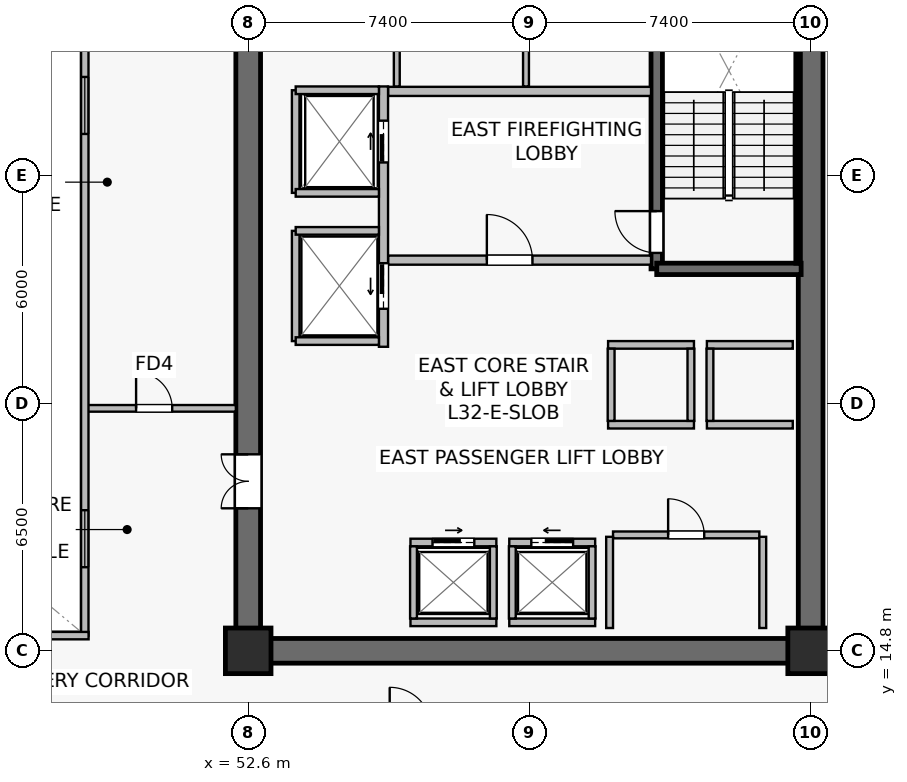
"""IFC4 building model, lengths in metres.
Left out: names, types, materials, properties, quantities, classifications, styles, units other than length and angle.
Written with IfcOpenShell. Run it as: python <this file> out.ifc"""

import sys

from ifc_helpers import new_model, si_unit, direction, frame, frame_2d, origin, origin_2d, place, context, subcontext, project, spatial, rectangle, extrude, source, transform, mapped, element, fill, save


model = new_model("IFC4")
c1 = context("Model", 3, precision=1e-05, world=origin(), true_north=direction((0.0, 1.0)))
c2 = subcontext(c1, "Body", "Model", "MODEL_VIEW")
j1 = project(units=[si_unit("LENGTHUNIT", "METRE"), si_unit("PLANEANGLEUNIT", "RADIAN")], contexts=[c1])
p1 = place(None, origin())
s1 = spatial("IfcSite", under=j1, at=p1, CompositionType="ELEMENT")
p2 = place(p1, origin())
s2 = spatial("IfcBuilding", under=s1, at=p2, CompositionType="ELEMENT")
p3 = place(p2, frame((0.0, 0.0, 133.8)))
s3 = spatial("IfcBuildingStorey", under=s2, at=p3, CompositionType="ELEMENT", Elevation=133.8)
p4 = place(p3, frame((52.275, 14.8, 0.0), z_axis=(0.0, 0.0, 1.0), x_axis=(1.0, 0.0, 0.0)))
e1 = element("IfcWall", 1, at=p4, inside=s3, PredefinedType="SHEAR", context=c2, shape_type="SweptSolid", body=[
    extrude(rectangle(XDim=15.45, YDim=0.65, at=frame_2d((7.725, 0.0))), origin(), (0.0, 0.0, 1.0), 3.79),
])
p5 = place(p3, frame((52.6, 15.125, 0.0), z_axis=(0.0, 0.0, 1.0), x_axis=(0.0, 1.0, 0.0)))
e2 = element("IfcWall", 2, at=p5, inside=s3, PredefinedType="SHEAR", context=c2, shape_type="SweptSolid", body=[
    extrude(rectangle(XDim=18.35, YDim=0.65, at=frame_2d((9.175, 0.0))), origin(), (0.0, 0.0, 1.0), 3.79),
])
p6 = place(p5, frame((3.425, 0.0, 0.0)))
e3 = element("IfcOpeningElement", 3, at=p6, cuts=e2, PredefinedType="OPENING", context=c2, shape_type="SweptSolid", body=[
    extrude(rectangle(XDim=1.42, YDim=2.2, at=frame_2d((0.71, 1.1))), frame((0.0, 0.335, 0.0), z_axis=(0.0, -1.0, 0.0), x_axis=(1.0, 0.0, 0.0)), (0.0, 0.0, 1.0), 0.67),
])
p7 = place(p3, frame((67.4, 15.125, 0.0), z_axis=(0.0, 0.0, 1.0), x_axis=(0.0, 1.0, 0.0)))
e4 = element("IfcWall", 4, at=p7, inside=s3, PredefinedType="SHEAR", context=c2, shape_type="SweptSolid", body=[
    extrude(rectangle(XDim=18.35, YDim=0.65, at=frame_2d((9.175, 0.0))), origin(), (0.0, 0.0, 1.0), 3.79),
])
p8 = place(p3, frame((63.35, 24.85, 0.0), z_axis=(0.0, 0.0, 1.0), x_axis=(0.0, 1.0, 0.0)))
e5 = element("IfcWall", 5, at=p8, inside=s3, PredefinedType="SHEAR", context=c2, shape_type="SweptSolid", body=[
    extrude(rectangle(XDim=8.63, YDim=0.3, at=frame_2d((4.315, 0.0))), origin(), (0.0, 0.0, 1.0), 3.79),
])
p9 = place(p8, frame((0.42, 0.0, 0.0)))
e6 = element("IfcOpeningElement", 6, at=p9, cuts=e5, PredefinedType="OPENING", context=c2, shape_type="SweptSolid", body=[
    extrude(rectangle(XDim=1.1, YDim=2.15, at=frame_2d((0.55, 1.075))), frame((0.0, 0.16, 0.0), z_axis=(0.0, -1.0, 0.0), x_axis=(1.0, 0.0, 0.0)), (0.0, 0.0, 1.0), 0.32),
])
p10 = place(p3, frame((63.35, 24.85, 0.0), z_axis=(0.0, 0.0, 1.0), x_axis=(1.0, 0.0, 0.0)))
e7 = element("IfcWall", 7, at=p10, inside=s3, PredefinedType="SHEAR", context=c2, shape_type="SweptSolid", body=[
    extrude(rectangle(XDim=3.8, YDim=0.3, at=frame_2d((1.9, 0.0))), origin(), (0.0, 0.0, 1.0), 3.79),
])
p11 = place(p3, frame((67.07, 25.0, 0.0), z_axis=(0.0, 0.0, 1.0), x_axis=(0.0, 1.0, 0.0)))
e8 = element("IfcWall", 8, at=p11, inside=s3, PredefinedType="SOLIDWALL", context=c2, shape_type="SweptSolid", body=[
    extrude(rectangle(XDim=8.32, YDim=0.12, at=frame_2d((4.16, 0.0))), origin(), (0.0, 0.0, 1.0), 3.79),
])
m1 = source(origin(), c2, "Body", "SweptSolid", [
    extrude(rectangle(XDim=1.2, YDim=1.2, at=origin_2d()), origin(), (0.0, 0.0, 1.0), 4.1),
])
for number, where, z_axis, x_axis in (
    (9, (52.6, 14.8, 0.0), (0.0, 0.0, 1.0), (1.0, 0.0, 0.0)),
    (10, (67.4, 14.8, 0.0), (0.0, 0.0, 1.0), (1.0, 0.0, 0.0)),
):
    element("IfcColumn", number, at=place(p3, frame(where, z_axis=z_axis, x_axis=x_axis)), inside=s3, PredefinedType="COLUMN", context=c2, shape_type="MappedRepresentation", body=[
        mapped(m1, transform((0.0, 0.0, 0.0), scale=1.0)),
    ])
p12 = place(p3, frame((56.28, 25.08, 0.0), z_axis=(0.0, 0.0, 1.0), x_axis=(1.0, 0.0, 0.0)))
e11 = element("IfcWall", 11, at=p12, inside=s3, PredefinedType="SOLIDWALL", context=c2, shape_type="SweptSolid", body=[
    extrude(rectangle(XDim=6.92, YDim=0.24, at=frame_2d((3.46, 0.0))), origin(), (0.0, 0.0, 1.0), 3.125),
])
p13 = place(p12, frame((2.6, 0.0, 0.0)))
e12 = element("IfcOpeningElement", 12, at=p13, cuts=e11, PredefinedType="OPENING", context=c2, shape_type="SweptSolid", body=[
    extrude(rectangle(XDim=1.2, YDim=2.16, at=frame_2d((0.6, 1.08))), frame((0.0, 0.13, 0.0), z_axis=(0.0, -1.0, 0.0), x_axis=(1.0, 0.0, 0.0)), (0.0, 0.0, 1.0), 0.26),
])
p14 = place(p3, frame((56.28, 29.52, 0.0), z_axis=(0.0, 0.0, 1.0), x_axis=(1.0, 0.0, 0.0)))
e13 = element("IfcWall", 13, at=p14, inside=s3, PredefinedType="SOLIDWALL", context=c2, shape_type="SweptSolid", body=[
    extrude(rectangle(XDim=6.92, YDim=0.24, at=frame_2d((3.46, 0.0))), origin(), (0.0, 0.0, 1.0), 3.125),
])
p15 = place(p3, frame((56.16, 22.8, 0.0), z_axis=(0.0, 0.0, 1.0), x_axis=(0.0, 1.0, 0.0)))
e14 = element("IfcWall", 14, at=p15, inside=s3, PredefinedType="SOLIDWALL", context=c2, shape_type="SweptSolid", body=[
    extrude(rectangle(XDim=6.85, YDim=0.24, at=frame_2d((3.425, 0.0))), origin(), (0.0, 0.0, 1.0), 2.875),
])
p16 = place(p15, frame((4.85, 0.0, 0.0)))
e15 = element("IfcOpeningElement", 15, at=p16, cuts=e14, PredefinedType="OPENING", context=c2, shape_type="SweptSolid", body=[
    extrude(rectangle(XDim=1.1, YDim=2.22, at=frame_2d((0.55, 1.11))), frame((0.0, 0.13, 0.0), z_axis=(0.0, -1.0, 0.0), x_axis=(1.0, 0.0, 0.0)), (0.0, 0.0, 1.0), 0.26),
])
p17 = place(p15, frame((1.0, 0.0, 0.0)))
e16 = element("IfcOpeningElement", 16, at=p17, cuts=e14, PredefinedType="OPENING", context=c2, shape_type="SweptSolid", body=[
    extrude(rectangle(XDim=1.2, YDim=2.22, at=frame_2d((0.6, 1.11))), frame((0.0, 0.13, 0.0), z_axis=(0.0, -1.0, 0.0), x_axis=(1.0, 0.0, 0.0)), (0.0, 0.0, 1.0), 0.26),
])
p18 = place(p3, frame((59.47, 17.65, 0.0), z_axis=(0.0, 0.0, 1.0), x_axis=(1.0, 0.0, 0.0)))
e17 = element("IfcWall", 17, at=p18, inside=s3, PredefinedType="SOLIDWALL", context=c2, shape_type="SweptSolid", body=[
    extrude(rectangle(XDim=2.26, YDim=0.2, at=frame_2d((1.13, 0.0))), origin(), (0.0, 0.0, 1.0), 3.125),
])
p19 = place(p18, frame((0.58, 0.0, 0.0)))
e18 = element("IfcOpeningElement", 18, at=p19, cuts=e17, PredefinedType="OPENING", context=c2, shape_type="SweptSolid", body=[
    extrude(rectangle(XDim=1.1, YDim=2.22, at=frame_2d((0.55, 1.11))), frame((0.0, 0.11, 0.0), z_axis=(0.0, -1.0, 0.0), x_axis=(1.0, 0.0, 0.0)), (0.0, 0.0, 1.0), 0.22),
])
p20 = place(p3, frame((59.47, 15.55, 0.0), z_axis=(0.0, 0.0, 1.0), x_axis=(1.0, 0.0, 0.0)))
e19 = element("IfcWall", 19, at=p20, inside=s3, PredefinedType="SOLIDWALL", context=c2, shape_type="SweptSolid", body=[
    extrude(rectangle(XDim=2.26, YDim=0.2, at=frame_2d((1.13, 0.0))), origin(), (0.0, 0.0, 1.0), 3.125),
])
for number, where, z_axis, x_axis in (
    (20, (59.55, 15.65, 0.0), (0.0, 0.0, 1.0), (0.0, 1.0, 0.0)),
    (21, (61.65, 15.65, 0.0), (0.0, 0.0, 1.0), (0.0, 1.0, 0.0)),
):
    element("IfcWall", number, at=place(p3, frame(where, z_axis=z_axis, x_axis=x_axis)), inside=s3, PredefinedType="SOLIDWALL", context=c2, shape_type="SweptSolid", body=[
        extrude(rectangle(XDim=1.9, YDim=0.18, at=frame_2d((0.95, 0.0))), origin(), (0.0, 0.0, 1.0), 3.79),
    ])
p21 = place(p3, frame((56.87, 17.65, 0.0), z_axis=(0.0, 0.0, 1.0), x_axis=(1.0, 0.0, 0.0)))
e22 = element("IfcWall", 22, at=p21, inside=s3, PredefinedType="SOLIDWALL", context=c2, shape_type="SweptSolid", body=[
    extrude(rectangle(XDim=2.26, YDim=0.2, at=frame_2d((1.13, 0.0))), origin(), (0.0, 0.0, 1.0), 3.79),
])
p22 = place(p21, frame((0.58, 0.0, 0.0)))
e23 = element("IfcOpeningElement", 23, at=p22, cuts=e22, PredefinedType="OPENING", context=c2, shape_type="SweptSolid", body=[
    extrude(rectangle(XDim=1.1, YDim=2.22, at=frame_2d((0.55, 1.11))), frame((0.0, 0.11, 0.0), z_axis=(0.0, -1.0, 0.0), x_axis=(1.0, 0.0, 0.0)), (0.0, 0.0, 1.0), 0.22),
])
p23 = place(p3, frame((56.87, 15.55, 0.0), z_axis=(0.0, 0.0, 1.0), x_axis=(1.0, 0.0, 0.0)))
e24 = element("IfcWall", 24, at=p23, inside=s3, PredefinedType="SOLIDWALL", context=c2, shape_type="SweptSolid", body=[
    extrude(rectangle(XDim=2.26, YDim=0.2, at=frame_2d((1.13, 0.0))), origin(), (0.0, 0.0, 1.0), 3.79),
])
for number, where, z_axis, x_axis in (
    (25, (56.95, 15.65, 0.0), (0.0, 0.0, 1.0), (0.0, 1.0, 0.0)),
    (26, (59.05, 15.65, 0.0), (0.0, 0.0, 1.0), (0.0, 1.0, 0.0)),
):
    element("IfcWall", number, at=place(p3, frame(where, z_axis=z_axis, x_axis=x_axis)), inside=s3, PredefinedType="SOLIDWALL", context=c2, shape_type="SweptSolid", body=[
        extrude(rectangle(XDim=1.9, YDim=0.18, at=frame_2d((0.95, 0.0))), origin(), (0.0, 0.0, 1.0), 3.79),
    ])
for number, where, z_axis, x_axis in (
    (27, (64.67, 20.75, 0.0), (0.0, 0.0, 1.0), (1.0, 0.0, 0.0)),
    (28, (64.67, 22.85, 0.0), (0.0, 0.0, 1.0), (1.0, 0.0, 0.0)),
):
    element("IfcWall", number, at=place(p3, frame(where, z_axis=z_axis, x_axis=x_axis)), inside=s3, PredefinedType="SOLIDWALL", context=c2, shape_type="SweptSolid", body=[
        extrude(rectangle(XDim=2.26, YDim=0.2, at=frame_2d((1.13, 0.0))), origin(), (0.0, 0.0, 1.0), 3.79),
    ])
p24 = place(p3, frame((64.75, 20.85, 0.0), z_axis=(0.0, 0.0, 1.0), x_axis=(0.0, 1.0, 0.0)))
e29 = element("IfcWall", 29, at=p24, inside=s3, PredefinedType="SOLIDWALL", context=c2, shape_type="SweptSolid", body=[
    extrude(rectangle(XDim=1.9, YDim=0.18, at=frame_2d((0.95, 0.0))), origin(), (0.0, 0.0, 1.0), 3.79),
])
for number, where, z_axis, x_axis in (
    (30, (62.07, 20.75, 0.0), (0.0, 0.0, 1.0), (1.0, 0.0, 0.0)),
    (31, (62.07, 22.85, 0.0), (0.0, 0.0, 1.0), (1.0, 0.0, 0.0)),
):
    element("IfcWall", number, at=place(p3, frame(where, z_axis=z_axis, x_axis=x_axis)), inside=s3, PredefinedType="SOLIDWALL", context=c2, shape_type="SweptSolid", body=[
        extrude(rectangle(XDim=2.26, YDim=0.2, at=frame_2d((1.13, 0.0))), origin(), (0.0, 0.0, 1.0), 3.79),
    ])
for number, where, z_axis, x_axis in (
    (32, (62.15, 20.85, 0.0), (0.0, 0.0, 1.0), (0.0, 1.0, 0.0)),
    (33, (64.25, 20.85, 0.0), (0.0, 0.0, 1.0), (0.0, 1.0, 0.0)),
):
    element("IfcWall", number, at=place(p3, frame(where, z_axis=z_axis, x_axis=x_axis)), inside=s3, PredefinedType="SOLIDWALL", context=c2, shape_type="SweptSolid", body=[
        extrude(rectangle(XDim=1.9, YDim=0.18, at=frame_2d((0.95, 0.0))), origin(), (0.0, 0.0, 1.0), 3.79),
    ])
p25 = place(p3, frame((53.85, 26.85, 0.0), z_axis=(0.0, 0.0, 1.0), x_axis=(0.0, 1.0, 0.0)))
e34 = element("IfcWall", 34, at=p25, inside=s3, PredefinedType="SOLIDWALL", context=c2, shape_type="SweptSolid", body=[
    extrude(rectangle(XDim=2.7, YDim=0.2, at=frame_2d((1.35, 0.0))), origin(), (0.0, 0.0, 1.0), 3.79),
])
p26 = place(p3, frame((53.85, 29.55, 0.0), z_axis=(0.0, 0.0, 1.0), x_axis=(1.0, 0.0, 0.0)))
e35 = element("IfcWall", 35, at=p26, inside=s3, PredefinedType="SOLIDWALL", context=c2, shape_type="SweptSolid", body=[
    extrude(rectangle(XDim=2.19, YDim=0.2, at=frame_2d((1.095, 0.0))), origin(), (0.0, 0.0, 1.0), 3.79),
])
p27 = place(p3, frame((53.85, 26.85, 0.0), z_axis=(0.0, 0.0, 1.0), x_axis=(1.0, 0.0, 0.0)))
e36 = element("IfcWall", 36, at=p27, inside=s3, PredefinedType="SOLIDWALL", context=c2, shape_type="SweptSolid", body=[
    extrude(rectangle(XDim=2.19, YDim=0.2, at=frame_2d((1.095, 0.0))), origin(), (0.0, 0.0, 1.0), 3.187),
])
p28 = place(p3, frame((53.85, 22.95, 0.0), z_axis=(0.0, 0.0, 1.0), x_axis=(0.0, 1.0, 0.0)))
e37 = element("IfcWall", 37, at=p28, inside=s3, PredefinedType="SOLIDWALL", context=c2, shape_type="SweptSolid", body=[
    extrude(rectangle(XDim=2.9, YDim=0.2, at=frame_2d((1.45, 0.0))), origin(), (0.0, 0.0, 1.0), 2.875),
])
for number, where, z_axis, x_axis in (
    (38, (53.85, 25.85, 0.0), (0.0, 0.0, 1.0), (1.0, 0.0, 0.0)),
    (39, (53.85, 22.95, 0.0), (0.0, 0.0, 1.0), (1.0, 0.0, 0.0)),
):
    element("IfcWall", number, at=place(p3, frame(where, z_axis=z_axis, x_axis=x_axis)), inside=s3, PredefinedType="SOLIDWALL", context=c2, shape_type="SweptSolid", body=[
        extrude(rectangle(XDim=2.19, YDim=0.2, at=frame_2d((1.095, 0.0))), origin(), (0.0, 0.0, 1.0), 3.79),
    ])
p29 = place(p3, frame((62.2, 17.85, 0.0), z_axis=(0.0, 0.0, 1.0), x_axis=(1.0, 0.0, 0.0)))
e40 = element("IfcWall", 40, at=p29, inside=s3, PredefinedType="SOLIDWALL", context=c2, shape_type="SweptSolid", body=[
    extrude(rectangle(XDim=3.85, YDim=0.18, at=frame_2d((1.925, 0.0))), origin(), (0.0, 0.0, 1.0), 3.79),
])
p30 = place(p29, frame((1.45, 0.0, 0.0)))
e41 = element("IfcOpeningElement", 41, at=p30, cuts=e40, PredefinedType="OPENING", context=c2, shape_type="SweptSolid", body=[
    extrude(rectangle(XDim=0.95, YDim=2.15, at=frame_2d((0.475, 1.075))), frame((0.0, 0.1, 0.0), z_axis=(0.0, -1.0, 0.0), x_axis=(1.0, 0.0, 0.0)), (0.0, 0.0, 1.0), 0.2),
])
for number, where, z_axis, x_axis in (
    (42, (62.11, 15.4, 0.0), (0.0, 0.0, 1.0), (0.0, 1.0, 0.0)),
    (43, (66.14, 15.4, 0.0), (0.0, 0.0, 1.0), (0.0, 1.0, 0.0)),
):
    element("IfcWall", number, at=place(p3, frame(where, z_axis=z_axis, x_axis=x_axis)), inside=s3, PredefinedType="SOLIDWALL", context=c2, shape_type="SweptSolid", body=[
        extrude(rectangle(XDim=2.4, YDim=0.18, at=frame_2d((1.2, 0.0))), origin(), (0.0, 0.0, 1.0), 3.79),
    ])
p31 = place(p3, frame((59.91, 29.65, 0.0), z_axis=(0.0, 0.0, 1.0), x_axis=(0.0, 1.0, 0.0)))
e44 = element("IfcWall", 44, at=p31, inside=s3, PredefinedType="PLUMBINGWALL", context=c2, shape_type="SweptSolid", body=[
    extrude(rectangle(XDim=3.93, YDim=0.155, at=frame_2d((1.965, 0.0))), origin(), (0.0, 0.0, 1.0), 3.125),
])
p32 = place(p3, frame((56.51, 29.65, 0.0), z_axis=(0.0, 0.0, 1.0), x_axis=(0.0, 1.0, 0.0)))
e45 = element("IfcWall", 45, at=p32, inside=s3, PredefinedType="PLUMBINGWALL", context=c2, shape_type="SweptSolid", body=[
    extrude(rectangle(XDim=3.93, YDim=0.155, at=frame_2d((1.965, 0.0))), origin(), (0.0, 0.0, 1.0), 3.79),
])
p33 = place(p3, frame((48.3, 21.18, 0.0), z_axis=(0.0, 0.0, 1.0), x_axis=(1.0, 0.0, 0.0)))
e46 = element("IfcWall", 46, at=p33, inside=s3, PredefinedType="PARTITIONING", context=c2, shape_type="SweptSolid", body=[
    extrude(rectangle(XDim=3.975, YDim=0.175, at=frame_2d((1.987, 0.0))), origin(), (0.0, 0.0, 1.0), 3.79),
])
p34 = place(p33, frame((1.35, 0.0, 0.0)))
e47 = element("IfcOpeningElement", 47, at=p34, cuts=e46, PredefinedType="OPENING", context=c2, shape_type="SweptSolid", body=[
    extrude(rectangle(XDim=0.95, YDim=2.15, at=frame_2d((0.475, 1.075))), frame((0.0, 0.098, 0.0), z_axis=(0.0, -1.0, 0.0), x_axis=(1.0, 0.0, 0.0)), (0.0, 0.0, 1.0), 0.195),
])
p35 = place(p3, frame((48.3, 15.2, 0.0), z_axis=(0.0, 0.0, 1.0), x_axis=(0.0, 1.0, 0.0)))
e48 = element("IfcWall", 48, at=p35, inside=s3, PredefinedType="SOLIDWALL", context=c2, shape_type="SweptSolid", body=[
    extrude(rectangle(XDim=18.2, YDim=0.195, at=frame_2d((9.1, 0.0))), origin(), (0.0, 0.0, 1.0), 3.79),
])
p36 = place(p35, frame((1.8, 0.0, 0.9)))
e49 = element("IfcOpeningElement", 49, at=p36, cuts=e48, PredefinedType="OPENING", context=c2, shape_type="SweptSolid", body=[
    extrude(rectangle(XDim=1.5, YDim=1.4, at=frame_2d((0.75, 0.7))), frame((0.0, 0.107, 0.0), z_axis=(0.0, -1.0, 0.0), x_axis=(1.0, 0.0, 0.0)), (0.0, 0.0, 1.0), 0.215),
])
p37 = place(p35, frame((13.2, 0.0, 0.9)))
e50 = element("IfcOpeningElement", 50, at=p37, cuts=e48, PredefinedType="OPENING", context=c2, shape_type="SweptSolid", body=[
    extrude(rectangle(XDim=1.5, YDim=1.4, at=frame_2d((0.75, 0.7))), frame((0.0, 0.107, 0.0), z_axis=(0.0, -1.0, 0.0), x_axis=(1.0, 0.0, 0.0)), (0.0, 0.0, 1.0), 0.215),
])
p38 = place(p3, frame((26.4, 15.2, 0.0), z_axis=(0.0, 0.0, 1.0), x_axis=(1.0, 0.0, 0.0)))
e51 = element("IfcWall", 51, at=p38, inside=s3, PredefinedType="SOLIDWALL", context=c2, shape_type="SweptSolid", body=[
    extrude(rectangle(XDim=22.0, YDim=0.195, at=frame_2d((11.0, 0.0))), origin(), (0.0, 0.0, 1.0), 3.79),
])
m2 = source(origin(), c2, "Body", "SweptSolid", [
    extrude(rectangle(XDim=1.5, YDim=1.4, at=frame_2d((0.75, 0.7))), frame((0.0, 0.03, 0.0), z_axis=(0.0, -1.0, 0.0), x_axis=(1.0, 0.0, 0.0)), (0.0, 0.0, 1.0), 0.06),
])
p39 = place(p36, origin())
e52 = element("IfcWindow", 52, at=p39, inside=s3, PartitioningType="SINGLE_PANEL", PredefinedType="WINDOW", context=c2, shape_type="MappedRepresentation", body=[
    mapped(m2, transform((0.0, 0.0, 0.0), scale=1.0)),
])
fill(e49, e52)
p40 = place(p37, origin())
e53 = element("IfcWindow", 53, at=p40, inside=s3, PartitioningType="SINGLE_PANEL", PredefinedType="WINDOW", context=c2, shape_type="MappedRepresentation", body=[
    mapped(m2, transform((0.0, 0.0, 0.0), scale=1.0)),
])
fill(e50, e53)
m3 = source(origin(), c2, "Body", "SweptSolid", [
    extrude(rectangle(XDim=1.1, YDim=2.15, at=frame_2d((0.55, 1.075))), frame((0.0, 0.025, 0.0), z_axis=(0.0, -1.0, 0.0), x_axis=(1.0, 0.0, 0.0)), (0.0, 0.0, 1.0), 0.05),
])
p41 = place(p9, origin())
e54 = element("IfcDoor", 54, at=p41, inside=s3, OperationType="SINGLE_SWING_RIGHT", PredefinedType="DOOR", context=c2, shape_type="MappedRepresentation", body=[
    mapped(m3, transform((0.0, 0.0, 0.0), scale=1.0)),
])
fill(e6, e54)
m4 = source(origin(), c2, "Body", "SweptSolid", [
    extrude(rectangle(XDim=1.2, YDim=2.16, at=frame_2d((0.6, 1.08))), frame((0.0, 0.025, 0.0), z_axis=(0.0, -1.0, 0.0), x_axis=(1.0, 0.0, 0.0)), (0.0, 0.0, 1.0), 0.05),
])
p42 = place(p13, origin())
e55 = element("IfcDoor", 55, at=p42, inside=s3, OperationType="SINGLE_SWING_LEFT", PredefinedType="DOOR", context=c2, shape_type="MappedRepresentation", body=[
    mapped(m4, transform((0.0, 0.0, 0.0), scale=1.0)),
])
fill(e12, e55)
m5 = source(origin(), c2, "Body", "SweptSolid", [
    extrude(rectangle(XDim=1.1, YDim=2.22, at=frame_2d((0.55, 1.11))), frame((0.0, 0.025, 0.0), z_axis=(0.0, -1.0, 0.0), x_axis=(1.0, 0.0, 0.0)), (0.0, 0.0, 1.0), 0.05),
])
p43 = place(p19, origin())
e56 = element("IfcDoor", 56, at=p43, inside=s3, OperationType="SLIDING_TO_LEFT", PredefinedType="USERDEFINED", context=c2, shape_type="MappedRepresentation", body=[
    mapped(m5, transform((0.0, 0.0, 0.0), scale=1.0)),
])
fill(e18, e56)
p44 = place(p22, origin())
e57 = element("IfcDoor", 57, at=p44, inside=s3, OperationType="SLIDING_TO_RIGHT", PredefinedType="USERDEFINED", context=c2, shape_type="MappedRepresentation", body=[
    mapped(m5, transform((0.0, 0.0, 0.0), scale=1.0)),
])
fill(e23, e57)
p45 = place(p16, origin())
e58 = element("IfcDoor", 58, at=p45, inside=s3, OperationType="SLIDING_TO_RIGHT", PredefinedType="USERDEFINED", context=c2, shape_type="MappedRepresentation", body=[
    mapped(m5, transform((0.0, 0.0, 0.0), scale=1.0)),
])
fill(e15, e58)
m6 = source(origin(), c2, "Body", "SweptSolid", [
    extrude(rectangle(XDim=1.2, YDim=2.22, at=frame_2d((0.6, 1.11))), frame((0.0, 0.025, 0.0), z_axis=(0.0, -1.0, 0.0), x_axis=(1.0, 0.0, 0.0)), (0.0, 0.0, 1.0), 0.05),
])
p46 = place(p17, origin())
e59 = element("IfcDoor", 59, at=p46, inside=s3, OperationType="SLIDING_TO_LEFT", PredefinedType="USERDEFINED", context=c2, shape_type="MappedRepresentation", body=[
    mapped(m6, transform((0.0, 0.0, 0.0), scale=1.0)),
])
fill(e16, e59)
m7 = source(origin(), c2, "Body", "SweptSolid", [
    extrude(rectangle(XDim=0.95, YDim=2.15, at=frame_2d((0.475, 1.075))), frame((0.0, 0.025, 0.0), z_axis=(0.0, -1.0, 0.0), x_axis=(1.0, 0.0, 0.0)), (0.0, 0.0, 1.0), 0.05),
])
p47 = place(p30, origin())
e60 = element("IfcDoor", 60, at=p47, inside=s3, OperationType="SINGLE_SWING_LEFT", PredefinedType="DOOR", context=c2, shape_type="MappedRepresentation", body=[
    mapped(m7, transform((0.0, 0.0, 0.0), scale=1.0)),
])
fill(e41, e60)
m8 = source(origin(), c2, "Body", "SweptSolid", [
    extrude(rectangle(XDim=1.42, YDim=2.2, at=frame_2d((0.71, 1.1))), frame((0.0, 0.025, 0.0), z_axis=(0.0, -1.0, 0.0), x_axis=(1.0, 0.0, 0.0)), (0.0, 0.0, 1.0), 0.05),
])
p48 = place(p6, origin())
e61 = element("IfcDoor", 61, at=p48, inside=s3, OperationType="DOUBLE_DOOR_SINGLE_SWING", PredefinedType="DOOR", context=c2, shape_type="MappedRepresentation", body=[
    mapped(m8, transform((0.0, 0.0, 0.0), scale=1.0)),
])
fill(e3, e61)
p49 = place(p34, origin())
e62 = element("IfcDoor", 62, at=p49, inside=s3, OperationType="SINGLE_SWING_LEFT", PredefinedType="DOOR", context=c2, shape_type="MappedRepresentation", body=[
    mapped(m7, transform((0.0, 0.0, 0.0), scale=1.0)),
])
fill(e47, e62)
save(model, sys.argv[1])
